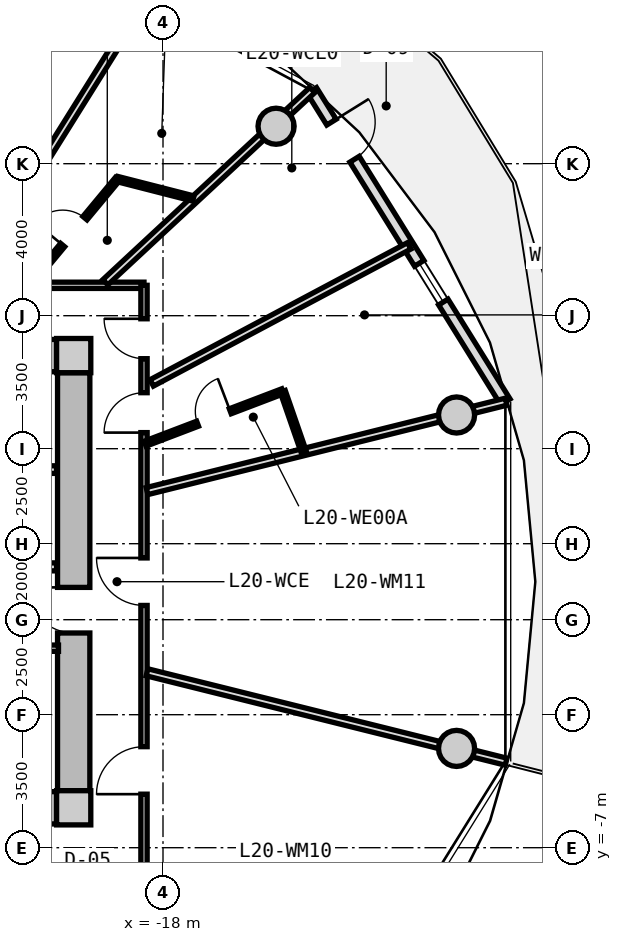
"""IFC4 building model, lengths in metres.
Left out: names, types, materials, properties, quantities, classifications, styles, units other than length and angle.
Written with IfcOpenShell. Run it as: python <this file> out.ifc"""

import sys

from ifc_helpers import new_model, si_unit, direction, frame, frame_2d, origin, origin_2d, place, context, subcontext, project, spatial, rectangle, circle, extrude, source, transform, mapped, element, fill, save


model = new_model("IFC4")
c1 = context("Model", 3, precision=1e-05, world=origin(), true_north=direction((0.0, 1.0)))
c2 = subcontext(c1, "Body", "Model", "MODEL_VIEW")
j1 = project(units=[si_unit("LENGTHUNIT", "METRE"), si_unit("PLANEANGLEUNIT", "RADIAN")], contexts=[c1])
p1 = place(None, origin())
s1 = spatial("IfcSite", under=j1, at=p1, CompositionType="ELEMENT")
p2 = place(p1, origin())
s2 = spatial("IfcBuilding", under=s1, at=p2, CompositionType="ELEMENT")
p3 = place(p2, frame((0.0, 0.0, 67.35)))
s3 = spatial("IfcBuildingStorey", under=s2, at=p3, CompositionType="ELEMENT", Elevation=67.35)
m1 = source(origin(), c2, "Body", "SweptSolid", [
    extrude(rectangle(XDim=0.9, YDim=0.9, at=origin_2d()), origin(), (0.0, 0.0, 1.0), 3.05),
])
for number, where, z_axis, x_axis in (
    (1, (-20.35, -5.95, 0.0), (0.0, 0.0, 1.0), (1.0, 0.0, 0.0)),
    (2, (-20.35, 5.95, 0.0), (0.0, 0.0, 1.0), (1.0, 0.0, 0.0)),
):
    element("IfcColumn", number, at=place(p3, frame(where, z_axis=z_axis, x_axis=x_axis)), inside=s3, PredefinedType="COLUMN", context=c2, shape_type="MappedRepresentation", body=[
        mapped(m1, transform((0.0, 0.0, 0.0), x_axis=(1.0, 0.0, 0.0), y_axis=(0.0, 1.0, 0.0), z_axis=(0.0, 0.0, 1.0), scale=1.0)),
    ])
m2 = source(origin(), c2, "Body", "SweptSolid", [
    extrude(rectangle(XDim=14.4, YDim=0.85, at=frame_2d((7.2, 0.0))), origin(), (0.0, 0.0, 1.0), 2.79),
])
for number, where, z_axis, x_axis in (
    (3, (-35.2, 5.95, 0.0), (0.0, 0.0, 1.0), (1.0, 0.0, 0.0)),
    (4, (-20.8, -5.95, 0.0), (0.0, 0.0, 1.0), (-1.0, 0.0, 0.0)),
):
    element("IfcWall", number, at=place(p3, frame(where, z_axis=z_axis, x_axis=x_axis)), inside=s3, PredefinedType="SHEAR", context=c2, shape_type="MappedRepresentation", body=[
        mapped(m2, transform((0.0, 0.0, 0.0), x_axis=(1.0, 0.0, 0.0), y_axis=(0.0, 1.0, 0.0), z_axis=(0.0, 0.0, 1.0), scale=1.0)),
    ])
m3 = source(origin(), c2, "Body", "SweptSolid", [
    extrude(rectangle(XDim=11.0, YDim=0.85, at=frame_2d((5.5, 0.0))), origin(), (0.0, 0.0, 1.0), 2.79),
])
p4 = place(p3, frame((-20.35, 5.5, 0.0), z_axis=(0.0, 0.0, 1.0), x_axis=(0.0, -1.0, 0.0)))
e5 = element("IfcWall", 5, at=p4, inside=s3, PredefinedType="SHEAR", context=c2, shape_type="MappedRepresentation", body=[
    mapped(m3, transform((0.0, 0.0, 0.0), x_axis=(1.0, 0.0, 0.0), y_axis=(0.0, 1.0, 0.0), z_axis=(0.0, 0.0, 1.0), scale=1.0)),
])
p5 = place(p4, frame((5.65, 0.0, 0.0)))
e6 = element("IfcOpeningElement", 6, at=p5, cuts=e5, PredefinedType="OPENING", context=c2, shape_type="SweptSolid", body=[
    extrude(rectangle(XDim=1.2, YDim=2.15, at=frame_2d((0.6, 1.075))), frame((0.0, 0.435, 0.0), z_axis=(0.0, -1.0, 0.0), x_axis=(1.0, 0.0, 0.0)), (0.0, 0.0, 1.0), 0.87),
])
m4 = source(origin(), c2, "Body", "SweptSolid", [
    extrude(circle(Radius=0.475, at=origin_2d()), origin(), (0.0, 0.0, 1.0), 3.05),
])
for number, where, z_axis, x_axis in (
    (7, (-10.275, 4.387, 0.0), (0.0, 0.0, 1.0), (1.0, 0.0, 0.0)),
    (8, (-15.025, 11.985, 0.0), (0.0, 0.0, 1.0), (1.0, 0.0, 0.0)),
    (9, (-10.275, -4.387, 0.0), (0.0, 0.0, 1.0), (1.0, 0.0, 0.0)),
):
    element("IfcColumn", number, at=place(p3, frame(where, z_axis=z_axis, x_axis=x_axis)), inside=s3, PredefinedType="COLUMN", context=c2, shape_type="MappedRepresentation", body=[
        mapped(m4, transform((0.0, 0.0, 0.0), x_axis=(1.0, 0.0, 0.0), y_axis=(0.0, 1.0, 0.0), z_axis=(0.0, 0.0, 1.0), scale=1.0)),
    ])
m5 = source(origin(), c2, "Body", "SweptSolid", [
    extrude(rectangle(XDim=9.649, YDim=0.29, at=frame_2d((4.824, 0.0))), origin(), (0.0, 0.0, 1.0), 2.79),
])
p6 = place(p3, frame((-14.084, 12.926, 0.0), z_axis=(0.0, 0.0, 1.0), x_axis=(0.527909458386, -0.849300655684, 0.0)))
e10 = element("IfcWall", 10, at=p6, inside=s3, PredefinedType="SOLIDWALL", context=c2, shape_type="MappedRepresentation", body=[
    mapped(m5, transform((0.0, 0.0, 0.0), x_axis=(1.0, 0.0, 0.0), y_axis=(0.0, 1.0, 0.0), z_axis=(0.0, 0.0, 1.0), scale=1.0)),
])
p7 = place(p6, frame((0.98, 0.0, 0.0)))
e11 = element("IfcOpeningElement", 11, at=p7, cuts=e10, PredefinedType="OPENING", context=c2, shape_type="SweptSolid", body=[
    extrude(rectangle(XDim=1.15, YDim=2.25, at=frame_2d((0.575, 1.125))), frame((0.0, 0.155, 0.0), z_axis=(0.0, -1.0, 0.0), x_axis=(1.0, 0.0, 0.0)), (0.0, 0.0, 1.0), 0.31),
])
p8 = place(p6, frame((5.354, 0.0, 0.85)))
e12 = element("IfcOpeningElement", 12, at=p8, cuts=e10, PredefinedType="OPENING", context=c2, shape_type="SweptSolid", body=[
    extrude(rectangle(XDim=1.2, YDim=1.5, at=frame_2d((0.6, 0.75))), frame((0.0, 0.155, 0.0), z_axis=(0.0, -1.0, 0.0), x_axis=(1.0, 0.0, 0.0)), (0.0, 0.0, 1.0), 0.31),
])
m6 = source(origin(), c2, "Body", "SweptSolid", [
    extrude(rectangle(XDim=3.2, YDim=0.2, at=frame_2d((1.6, 0.0))), origin(), (0.0, 0.0, 1.0), 2.775),
])
p9 = place(p3, frame((-24.0, 2.95, 0.0), z_axis=(0.0, 0.0, 1.0), x_axis=(1.0, 0.0, 0.0)))
e13 = element("IfcWall", 13, at=p9, inside=s3, PredefinedType="PARTITIONING", context=c2, shape_type="MappedRepresentation", body=[
    mapped(m6, transform((0.0, 0.0, 0.0), x_axis=(1.0, 0.0, 0.0), y_axis=(0.0, 1.0, 0.0), z_axis=(0.0, 0.0, 1.0), scale=1.0)),
])
m7 = source(origin(), c2, "Body", "SweptSolid", [
    extrude(rectangle(XDim=6.66, YDim=0.21, at=frame_2d((3.33, 0.0))), origin(), (0.0, 0.0, 1.0), 2.775),
])
p10 = place(p3, frame((-27.46, 0.39, 0.0), z_axis=(0.0, 0.0, 1.0), x_axis=(1.0, 0.0, 0.0)))
e14 = element("IfcWall", 14, at=p10, inside=s3, PredefinedType="PARTITIONING", context=c2, shape_type="MappedRepresentation", body=[
    mapped(m7, transform((0.0, 0.0, 0.0), x_axis=(1.0, 0.0, 0.0), y_axis=(0.0, 1.0, 0.0), z_axis=(0.0, 0.0, 1.0), scale=1.0)),
])
p11 = place(p10, frame((1.0, 0.0, 0.0)))
e15 = element("IfcOpeningElement", 15, at=p11, cuts=e14, PredefinedType="OPENING", context=c2, shape_type="SweptSolid", body=[
    extrude(rectangle(XDim=1.2, YDim=2.15, at=frame_2d((0.6, 1.075))), frame((0.0, 0.115, 0.0), z_axis=(0.0, -1.0, 0.0), x_axis=(1.0, 0.0, 0.0)), (0.0, 0.0, 1.0), 0.23),
])
m8 = source(origin(), c2, "Body", "SweptSolid", [
    extrude(rectangle(XDim=2.7, YDim=0.165, at=frame_2d((1.35, 0.0))), origin(), (0.0, 0.0, 1.0), 2.775),
])
p12 = place(p3, frame((-23.45, -1.75, 0.0), z_axis=(0.0, 0.0, 1.0), x_axis=(1.0, 0.0, 0.0)))
e16 = element("IfcWall", 16, at=p12, inside=s3, PredefinedType="PARTITIONING", context=c2, shape_type="MappedRepresentation", body=[
    mapped(m8, transform((0.0, 0.0, 0.0), x_axis=(1.0, 0.0, 0.0), y_axis=(0.0, 1.0, 0.0), z_axis=(0.0, 0.0, 1.0), scale=1.0)),
])
p13 = place(p12, frame((0.222, 0.0, 0.0)))
e17 = element("IfcOpeningElement", 17, at=p13, cuts=e16, PredefinedType="OPENING", context=c2, shape_type="SweptSolid", body=[
    extrude(rectangle(XDim=0.925, YDim=2.1, at=frame_2d((0.462, 1.05))), frame((0.0, 0.093, 0.0), z_axis=(0.0, -1.0, 0.0), x_axis=(1.0, 0.0, 0.0)), (0.0, 0.0, 1.0), 0.185),
])
p14 = place(p12, frame((1.522, 0.0, 0.0)))
e18 = element("IfcOpeningElement", 18, at=p14, cuts=e16, PredefinedType="OPENING", context=c2, shape_type="SweptSolid", body=[
    extrude(rectangle(XDim=0.925, YDim=2.1, at=frame_2d((0.462, 1.05))), frame((0.0, 0.093, 0.0), z_axis=(0.0, -1.0, 0.0), x_axis=(1.0, 0.0, 0.0)), (0.0, 0.0, 1.0), 0.185),
])
m9 = source(origin(), c2, "Body", "SweptSolid", [
    extrude(rectangle(XDim=19.0, YDim=0.165, at=frame_2d((9.5, 0.0))), origin(), (0.0, 0.0, 1.0), 2.775),
])
p15 = place(p3, frame((-37.5, 7.8, 0.0), z_axis=(0.0, 0.0, 1.0), x_axis=(1.0, 0.0, 0.0)))
e19 = element("IfcWall", 19, at=p15, inside=s3, PredefinedType="PARTITIONING", context=c2, shape_type="MappedRepresentation", body=[
    mapped(m9, transform((0.0, 0.0, 0.0), x_axis=(1.0, 0.0, 0.0), y_axis=(0.0, 1.0, 0.0), z_axis=(0.0, 0.0, 1.0), scale=1.0)),
])
p16 = place(p15, frame((14.653, 0.0, 0.0)))
e20 = element("IfcOpeningElement", 20, at=p16, cuts=e19, PredefinedType="OPENING", context=c2, shape_type="SweptSolid", body=[
    extrude(rectangle(XDim=1.05, YDim=2.15, at=frame_2d((0.525, 1.075))), frame((0.0, 0.093, 0.0), z_axis=(0.0, -1.0, 0.0), x_axis=(1.0, 0.0, 0.0)), (0.0, 0.0, 1.0), 0.185),
])
p17 = place(p15, frame((12.5, 0.0, 0.0)))
e21 = element("IfcOpeningElement", 21, at=p17, cuts=e19, PredefinedType="OPENING", context=c2, shape_type="SweptSolid", body=[
    extrude(rectangle(XDim=1.05, YDim=2.15, at=frame_2d((0.525, 1.075))), frame((0.0, 0.093, 0.0), z_axis=(0.0, -1.0, 0.0), x_axis=(1.0, 0.0, 0.0)), (0.0, 0.0, 1.0), 0.185),
])
p18 = place(p15, frame((9.352, 0.0, 0.0)))
e22 = element("IfcOpeningElement", 22, at=p18, cuts=e19, PredefinedType="OPENING", context=c2, shape_type="SweptSolid", body=[
    extrude(rectangle(XDim=1.05, YDim=2.15, at=frame_2d((0.525, 1.075))), frame((0.0, 0.093, 0.0), z_axis=(0.0, -1.0, 0.0), x_axis=(1.0, 0.0, 0.0)), (0.0, 0.0, 1.0), 0.185),
])
p19 = place(p15, frame((7.806, 0.0, 0.0)))
e23 = element("IfcOpeningElement", 23, at=p19, cuts=e19, PredefinedType="OPENING", context=c2, shape_type="SweptSolid", body=[
    extrude(rectangle(XDim=1.05, YDim=2.15, at=frame_2d((0.525, 1.075))), frame((0.0, 0.093, 0.0), z_axis=(0.0, -1.0, 0.0), x_axis=(1.0, 0.0, 0.0)), (0.0, 0.0, 1.0), 0.185),
])
p20 = place(p15, frame((4.773, 0.0, 0.0)))
e24 = element("IfcOpeningElement", 24, at=p20, cuts=e19, PredefinedType="OPENING", context=c2, shape_type="SweptSolid", body=[
    extrude(rectangle(XDim=1.05, YDim=2.15, at=frame_2d((0.525, 1.075))), frame((0.0, 0.093, 0.0), z_axis=(0.0, -1.0, 0.0), x_axis=(1.0, 0.0, 0.0)), (0.0, 0.0, 1.0), 0.185),
])
p21 = place(p15, frame((2.251, 0.0, 0.0)))
e25 = element("IfcOpeningElement", 25, at=p21, cuts=e19, PredefinedType="OPENING", context=c2, shape_type="SweptSolid", body=[
    extrude(rectangle(XDim=1.05, YDim=2.15, at=frame_2d((0.525, 1.075))), frame((0.0, 0.093, 0.0), z_axis=(0.0, -1.0, 0.0), x_axis=(1.0, 0.0, 0.0)), (0.0, 0.0, 1.0), 0.185),
])
m10 = source(origin(), c2, "Body", "SweptSolid", [
    extrude(rectangle(XDim=15.6, YDim=0.165, at=frame_2d((7.8, 0.0))), origin(), (0.0, 0.0, 1.0), 2.775),
])
p22 = place(p3, frame((-18.5, 7.8, 0.0), z_axis=(0.0, 0.0, 1.0), x_axis=(0.0, -1.0, 0.0)))
e26 = element("IfcWall", 26, at=p22, inside=s3, PredefinedType="PARTITIONING", context=c2, shape_type="MappedRepresentation", body=[
    mapped(m10, transform((0.0, 0.0, 0.0), x_axis=(1.0, 0.0, 0.0), y_axis=(0.0, 1.0, 0.0), z_axis=(0.0, 0.0, 1.0), scale=1.0)),
])
p23 = place(p22, frame((12.141, 0.0, 0.0)))
e27 = element("IfcOpeningElement", 27, at=p23, cuts=e26, PredefinedType="OPENING", context=c2, shape_type="SweptSolid", body=[
    extrude(rectangle(XDim=1.25, YDim=2.2, at=frame_2d((0.625, 1.1))), frame((0.0, 0.093, 0.0), z_axis=(0.0, -1.0, 0.0), x_axis=(1.0, 0.0, 0.0)), (0.0, 0.0, 1.0), 0.185),
])
p24 = place(p22, frame((7.175, 0.0, 0.0)))
e28 = element("IfcOpeningElement", 28, at=p24, cuts=e26, PredefinedType="OPENING", context=c2, shape_type="SweptSolid", body=[
    extrude(rectangle(XDim=1.25, YDim=2.2, at=frame_2d((0.625, 1.1))), frame((0.0, 0.093, 0.0), z_axis=(0.0, -1.0, 0.0), x_axis=(1.0, 0.0, 0.0)), (0.0, 0.0, 1.0), 0.185),
])
p25 = place(p22, frame((2.826, 0.0, 0.0)))
e29 = element("IfcOpeningElement", 29, at=p25, cuts=e26, PredefinedType="OPENING", context=c2, shape_type="SweptSolid", body=[
    extrude(rectangle(XDim=1.05, YDim=2.15, at=frame_2d((0.525, 1.075))), frame((0.0, 0.093, 0.0), z_axis=(0.0, -1.0, 0.0), x_axis=(1.0, 0.0, 0.0)), (0.0, 0.0, 1.0), 0.185),
])
p26 = place(p22, frame((0.881, 0.0, 0.0)))
e30 = element("IfcOpeningElement", 30, at=p26, cuts=e26, PredefinedType="OPENING", context=c2, shape_type="SweptSolid", body=[
    extrude(rectangle(XDim=1.05, YDim=2.15, at=frame_2d((0.525, 1.075))), frame((0.0, 0.093, 0.0), z_axis=(0.0, -1.0, 0.0), x_axis=(1.0, 0.0, 0.0)), (0.0, 0.0, 1.0), 0.185),
])
m11 = source(origin(), c2, "Body", "SweptSolid", [
    extrude(rectangle(XDim=9.737, YDim=0.19, at=frame_2d((4.869, 0.0))), origin(), (0.0, 0.0, 1.0), 2.225),
])
p27 = place(p3, frame((-18.42, -2.385, 0.0), z_axis=(0.0, 0.0, 1.0), x_axis=(0.970392716238, -0.241532557375, 0.0)))
e31 = element("IfcWall", 31, at=p27, inside=s3, PredefinedType="PARTITIONING", context=c2, shape_type="MappedRepresentation", body=[
    mapped(m11, transform((0.0, 0.0, 0.0), x_axis=(1.0, 0.0, 0.0), y_axis=(0.0, 1.0, 0.0), z_axis=(0.0, 0.0, 1.0), scale=1.0)),
])
m12 = source(origin(), c2, "Body", "SweptSolid", [
    extrude(rectangle(XDim=9.737, YDim=0.19, at=frame_2d((4.869, 0.0))), origin(), (0.0, 0.0, 1.0), 2.415),
])
p28 = place(p3, frame((-18.42, 2.385, 0.0), z_axis=(0.0, 0.0, 1.0), x_axis=(0.970392716238, 0.241532557375, 0.0)))
e32 = element("IfcWall", 32, at=p28, inside=s3, PredefinedType="PARTITIONING", context=c2, shape_type="MappedRepresentation", body=[
    mapped(m12, transform((0.0, 0.0, 0.0), x_axis=(1.0, 0.0, 0.0), y_axis=(0.0, 1.0, 0.0), z_axis=(0.0, 0.0, 1.0), scale=1.0)),
])
m13 = source(origin(), c2, "Body", "SweptSolid", [
    extrude(rectangle(XDim=7.435, YDim=0.19, at=frame_2d((3.717, 0.0))), origin(), (0.0, 0.0, 1.0), 2.225),
])
p29 = place(p3, frame((-19.517, 7.88, 0.0), z_axis=(0.0, 0.0, 1.0), x_axis=(0.732651956848, 0.680603489652, 0.0)))
e33 = element("IfcWall", 33, at=p29, inside=s3, PredefinedType="PARTITIONING", context=c2, shape_type="MappedRepresentation", body=[
    mapped(m13, transform((0.0, 0.0, 0.0), x_axis=(1.0, 0.0, 0.0), y_axis=(0.0, 1.0, 0.0), z_axis=(0.0, 0.0, 1.0), scale=1.0)),
])
m14 = source(origin(), c2, "Body", "SweptSolid", [
    extrude(rectangle(XDim=7.677, YDim=0.19, at=frame_2d((3.838, 0.0))), origin(), (0.0, 0.0, 1.0), 2.775),
])
p30 = place(p3, frame((-18.297, 5.231, 0.0), z_axis=(0.0, 0.0, 1.0), x_axis=(0.882725057546, 0.469889851753, 0.0)))
e34 = element("IfcWall", 34, at=p30, inside=s3, PredefinedType="PARTITIONING", context=c2, shape_type="MappedRepresentation", body=[
    mapped(m14, transform((0.0, 0.0, 0.0), x_axis=(1.0, 0.0, 0.0), y_axis=(0.0, 1.0, 0.0), z_axis=(0.0, 0.0, 1.0), scale=1.0)),
])
m15 = source(origin(), c2, "Body", "SweptSolid", [
    extrude(rectangle(XDim=3.874, YDim=0.14, at=frame_2d((1.937, 0.0))), origin(), (0.0, 0.0, 1.0), 2.775),
])
p31 = place(p3, frame((-18.47, 3.632, 0.0), z_axis=(0.0, 0.0, 1.0), x_axis=(0.934461775659, 0.35606346321, 0.0)))
e35 = element("IfcWall", 35, at=p31, inside=s3, PredefinedType="PARTITIONING", context=c2, shape_type="MappedRepresentation", body=[
    mapped(m15, transform((0.0, 0.0, 0.0), x_axis=(1.0, 0.0, 0.0), y_axis=(0.0, 1.0, 0.0), z_axis=(0.0, 0.0, 1.0), scale=1.0)),
])
p32 = place(p31, frame((1.477, 0.0, 0.0)))
e36 = element("IfcOpeningElement", 36, at=p32, cuts=e35, PredefinedType="OPENING", context=c2, shape_type="SweptSolid", body=[
    extrude(rectangle(XDim=0.92, YDim=2.1, at=frame_2d((0.46, 1.05))), frame((0.0, 0.08, 0.0), z_axis=(0.0, -1.0, 0.0), x_axis=(1.0, 0.0, 0.0)), (0.0, 0.0, 1.0), 0.16),
])
m16 = source(origin(), c2, "Body", "SweptSolid", [
    extrude(rectangle(XDim=1.676, YDim=0.14, at=frame_2d((0.838, 0.0))), origin(), (0.0, 0.0, 1.0), 2.775),
])
p33 = place(p3, frame((-14.85, 5.011, 0.0), z_axis=(0.0, 0.0, 1.0), x_axis=(0.327785970556, -0.944752008469, 0.0)))
e37 = element("IfcWall", 37, at=p33, inside=s3, PredefinedType="PARTITIONING", context=c2, shape_type="MappedRepresentation", body=[
    mapped(m16, transform((0.0, 0.0, 0.0), x_axis=(1.0, 0.0, 0.0), y_axis=(0.0, 1.0, 0.0), z_axis=(0.0, 0.0, 1.0), scale=1.0)),
])
m17 = source(origin(), c2, "Body", "SweptSolid", [
    extrude(rectangle(XDim=8.598, YDim=0.19, at=frame_2d((4.299, 0.0))), origin(), (0.0, 0.0, 1.0), 2.775),
])
p34 = place(p3, frame((-23.043, 8.017, 0.0), z_axis=(0.0, 0.0, 1.0), x_axis=(0.530039776395, 0.847972779893, 0.0)))
e38 = element("IfcWall", 38, at=p34, inside=s3, PredefinedType="PARTITIONING", context=c2, shape_type="MappedRepresentation", body=[
    mapped(m17, transform((0.0, 0.0, 0.0), x_axis=(1.0, 0.0, 0.0), y_axis=(0.0, 1.0, 0.0), z_axis=(0.0, 0.0, 1.0), scale=1.0)),
])
m18 = source(origin(), c2, "Body", "SweptSolid", [
    extrude(rectangle(XDim=3.594, YDim=0.14, at=frame_2d((1.797, 0.0))), origin(), (0.0, 0.0, 1.0), 2.775),
])
p35 = place(p3, frame((-21.496, 7.83, 0.0), z_axis=(0.0, 0.0, 1.0), x_axis=(0.639001147083, 0.769205781326, 0.0)))
e39 = element("IfcWall", 39, at=p35, inside=s3, PredefinedType="PARTITIONING", context=c2, shape_type="MappedRepresentation", body=[
    mapped(m18, transform((0.0, 0.0, 0.0), x_axis=(1.0, 0.0, 0.0), y_axis=(0.0, 1.0, 0.0), z_axis=(0.0, 0.0, 1.0), scale=1.0)),
])
p36 = place(p35, frame((1.337, 0.0, 0.0)))
e40 = element("IfcOpeningElement", 40, at=p36, cuts=e39, PredefinedType="OPENING", context=c2, shape_type="SweptSolid", body=[
    extrude(rectangle(XDim=0.92, YDim=2.1, at=frame_2d((0.46, 1.05))), frame((0.0, 0.08, 0.0), z_axis=(0.0, -1.0, 0.0), x_axis=(1.0, 0.0, 0.0)), (0.0, 0.0, 1.0), 0.16),
])
m19 = source(origin(), c2, "Body", "SweptSolid", [
    extrude(rectangle(XDim=2.062, YDim=0.14, at=frame_2d((1.031, 0.0))), origin(), (0.0, 0.0, 1.0), 2.415),
])
p37 = place(p3, frame((-19.199, 10.595, 0.0), z_axis=(0.0, 0.0, 1.0), x_axis=(0.968776253543, -0.247936626121, 0.0)))
e41 = element("IfcWall", 41, at=p37, inside=s3, PredefinedType="PARTITIONING", context=c2, shape_type="MappedRepresentation", body=[
    mapped(m19, transform((0.0, 0.0, 0.0), x_axis=(1.0, 0.0, 0.0), y_axis=(0.0, 1.0, 0.0), z_axis=(0.0, 0.0, 1.0), scale=1.0)),
])
m20 = source(origin(), c2, "Body", "SweptSolid", [
    extrude(rectangle(XDim=1.15, YDim=2.25, at=frame_2d((0.575, 1.125))), frame((0.0, 0.025, 0.0), z_axis=(0.0, -1.0, 0.0), x_axis=(1.0, 0.0, 0.0)), (0.0, 0.0, 1.0), 0.05),
])
p38 = place(p7, origin())
e42 = element("IfcDoor", 42, at=p38, inside=s3, OperationType="SINGLE_SWING_LEFT", PredefinedType="DOOR", context=c2, shape_type="MappedRepresentation", body=[
    mapped(m20, transform((0.0, 0.0, 0.0), x_axis=(1.0, 0.0, 0.0), y_axis=(0.0, 1.0, 0.0), z_axis=(0.0, 0.0, 1.0), scale=1.0)),
])
fill(e11, e42)
m21 = source(origin(), c2, "Body", "SweptSolid", [
    extrude(rectangle(XDim=1.2, YDim=1.5, at=frame_2d((0.6, 0.75))), frame((0.0, 0.03, 0.0), z_axis=(0.0, -1.0, 0.0), x_axis=(1.0, 0.0, 0.0)), (0.0, 0.0, 1.0), 0.06),
])
p39 = place(p8, origin())
e43 = element("IfcWindow", 43, at=p39, inside=s3, PartitioningType="SINGLE_PANEL", PredefinedType="WINDOW", context=c2, shape_type="MappedRepresentation", body=[
    mapped(m21, transform((0.0, 0.0, 0.0), x_axis=(1.0, 0.0, 0.0), y_axis=(0.0, 1.0, 0.0), z_axis=(0.0, 0.0, 1.0), scale=1.0)),
])
fill(e12, e43)
m22 = source(origin(), c2, "Body", "SweptSolid", [
    extrude(rectangle(XDim=1.2, YDim=2.15, at=frame_2d((0.6, 1.075))), frame((0.0, 0.025, 0.0), z_axis=(0.0, -1.0, 0.0), x_axis=(1.0, 0.0, 0.0)), (0.0, 0.0, 1.0), 0.05),
])
p40 = place(p5, frame((1.2, 0.0, 0.0), z_axis=(0.0, 0.0, 1.0), x_axis=(-1.0, 0.0, 0.0)))
e44 = element("IfcDoor", 44, at=p40, inside=s3, OperationType="SINGLE_SWING_RIGHT", PredefinedType="DOOR", context=c2, shape_type="MappedRepresentation", body=[
    mapped(m22, transform((0.0, 0.0, 0.0), x_axis=(1.0, 0.0, 0.0), y_axis=(0.0, 1.0, 0.0), z_axis=(0.0, 0.0, 1.0), scale=1.0)),
])
fill(e6, e44)
m23 = source(origin(), c2, "Body", "SweptSolid", [
    extrude(rectangle(XDim=1.25, YDim=2.2, at=frame_2d((0.625, 1.1))), frame((0.0, 0.025, 0.0), z_axis=(0.0, -1.0, 0.0), x_axis=(1.0, 0.0, 0.0)), (0.0, 0.0, 1.0), 0.05),
])
p41 = place(p23, frame((1.25, 0.0, 0.0), z_axis=(0.0, 0.0, 1.0), x_axis=(-1.0, 0.0, 0.0)))
e45 = element("IfcDoor", 45, at=p41, inside=s3, OperationType="SINGLE_SWING_LEFT", PredefinedType="DOOR", context=c2, shape_type="MappedRepresentation", body=[
    mapped(m23, transform((0.0, 0.0, 0.0), x_axis=(1.0, 0.0, 0.0), y_axis=(0.0, 1.0, 0.0), z_axis=(0.0, 0.0, 1.0), scale=1.0)),
])
fill(e27, e45)
p42 = place(p24, frame((1.25, 0.0, 0.0), z_axis=(0.0, 0.0, 1.0), x_axis=(-1.0, 0.0, 0.0)))
e46 = element("IfcDoor", 46, at=p42, inside=s3, OperationType="SINGLE_SWING_RIGHT", PredefinedType="DOOR", context=c2, shape_type="MappedRepresentation", body=[
    mapped(m23, transform((0.0, 0.0, 0.0), x_axis=(1.0, 0.0, 0.0), y_axis=(0.0, 1.0, 0.0), z_axis=(0.0, 0.0, 1.0), scale=1.0)),
])
fill(e28, e46)
m24 = source(origin(), c2, "Body", "SweptSolid", [
    extrude(rectangle(XDim=1.05, YDim=2.15, at=frame_2d((0.525, 1.075))), frame((0.0, 0.025, 0.0), z_axis=(0.0, -1.0, 0.0), x_axis=(1.0, 0.0, 0.0)), (0.0, 0.0, 1.0), 0.05),
])
p43 = place(p25, frame((1.05, 0.0, 0.0), z_axis=(0.0, 0.0, 1.0), x_axis=(-1.0, 0.0, 0.0)))
e47 = element("IfcDoor", 47, at=p43, inside=s3, OperationType="SINGLE_SWING_LEFT", PredefinedType="DOOR", context=c2, shape_type="MappedRepresentation", body=[
    mapped(m24, transform((0.0, 0.0, 0.0), x_axis=(1.0, 0.0, 0.0), y_axis=(0.0, 1.0, 0.0), z_axis=(0.0, 0.0, 1.0), scale=1.0)),
])
fill(e29, e47)
m25 = source(origin(), c2, "Body", "SweptSolid", [
    extrude(rectangle(XDim=0.92, YDim=2.1, at=frame_2d((0.46, 1.05))), frame((0.0, 0.025, 0.0), z_axis=(0.0, -1.0, 0.0), x_axis=(1.0, 0.0, 0.0)), (0.0, 0.0, 1.0), 0.05),
])
p44 = place(p32, origin())
e48 = element("IfcDoor", 48, at=p44, inside=s3, OperationType="SINGLE_SWING_RIGHT", PredefinedType="DOOR", context=c2, shape_type="MappedRepresentation", body=[
    mapped(m25, transform((0.0, 0.0, 0.0), x_axis=(1.0, 0.0, 0.0), y_axis=(0.0, 1.0, 0.0), z_axis=(0.0, 0.0, 1.0), scale=1.0)),
])
fill(e36, e48)
p45 = place(p26, frame((1.05, 0.0, 0.0), z_axis=(0.0, 0.0, 1.0), x_axis=(-1.0, 0.0, 0.0)))
e49 = element("IfcDoor", 49, at=p45, inside=s3, OperationType="SINGLE_SWING_RIGHT", PredefinedType="DOOR", context=c2, shape_type="MappedRepresentation", body=[
    mapped(m24, transform((0.0, 0.0, 0.0), x_axis=(1.0, 0.0, 0.0), y_axis=(0.0, 1.0, 0.0), z_axis=(0.0, 0.0, 1.0), scale=1.0)),
])
fill(e30, e49)
p46 = place(p36, origin())
e50 = element("IfcDoor", 50, at=p46, inside=s3, OperationType="SINGLE_SWING_LEFT", PredefinedType="DOOR", context=c2, shape_type="MappedRepresentation", body=[
    mapped(m25, transform((0.0, 0.0, 0.0), x_axis=(1.0, 0.0, 0.0), y_axis=(0.0, 1.0, 0.0), z_axis=(0.0, 0.0, 1.0), scale=1.0)),
])
fill(e40, e50)
save(model, sys.argv[1])
